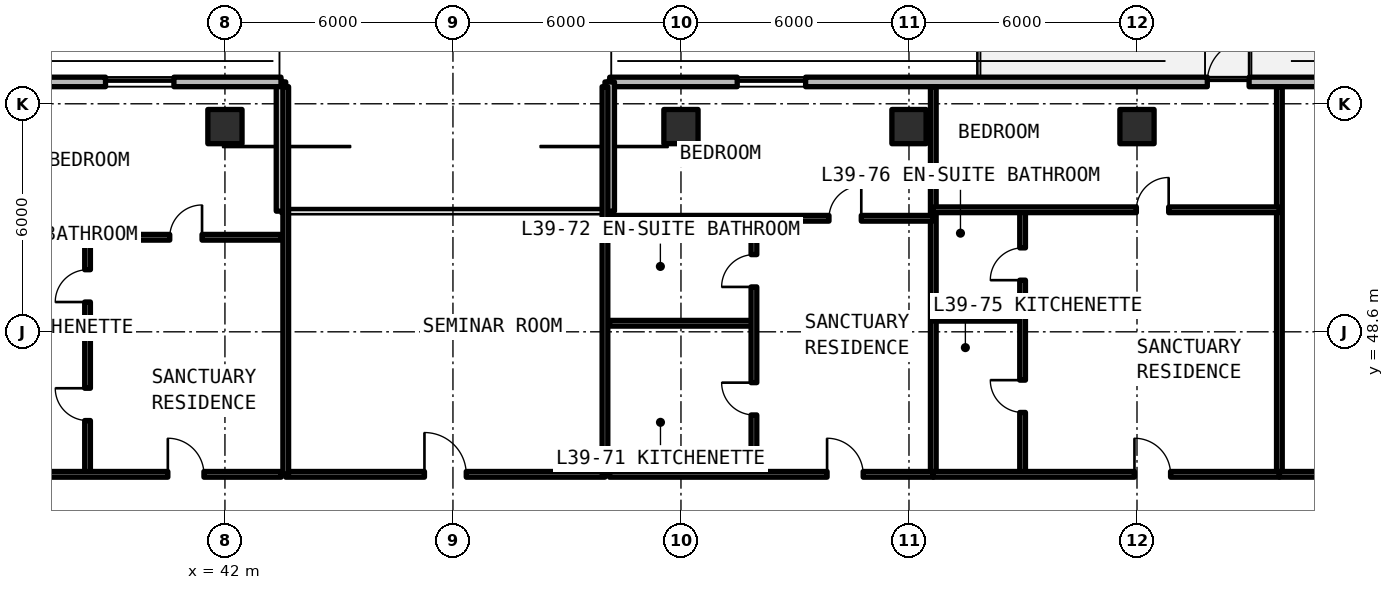
"""IFC4 building model, lengths in metres.
Left out: names, types, materials, properties, quantities, classifications, styles, units other than length and angle.
Written with IfcOpenShell. Run it as: python <this file> out.ifc"""

import sys

from ifc_helpers import new_model, si_unit, direction, frame, frame_2d, origin, origin_2d, place, context, subcontext, project, spatial, rectangle, extrude, element, fill, save


model = new_model("IFC4")
c1 = context("Model", 3, precision=1e-05, world=origin(), true_north=direction((0.0, 1.0)))
c2 = subcontext(c1, "Body", "Model", "MODEL_VIEW")
j1 = project(units=[si_unit("LENGTHUNIT", "METRE"), si_unit("PLANEANGLEUNIT", "RADIAN")], contexts=[c1])
p1 = place(None, origin())
s1 = spatial("IfcSite", under=j1, at=p1, CompositionType="ELEMENT")
p2 = place(p1, origin())
s2 = spatial("IfcBuilding", under=s1, at=p2, CompositionType="ELEMENT")
p3 = place(p2, frame((0.0, 0.0, 141.9)))
s3 = spatial("IfcBuildingStorey", under=s2, at=p3, CompositionType="ELEMENT", Elevation=141.9)
for number, where, z_axis, x_axis in (
    (1, (42.0, 54.0, 0.0), (0.0, 0.0, 1.0), (1.0, 0.0, 0.0)),
    (2, (54.0, 54.0, 0.0), (0.0, 0.0, 1.0), (1.0, 0.0, 0.0)),
    (3, (60.0, 54.0, 0.0), (0.0, 0.0, 1.0), (1.0, 0.0, 0.0)),
    (4, (66.0, 54.0, 0.0), (0.0, 0.0, 1.0), (1.0, 0.0, 0.0)),
):
    element("IfcColumn", number, at=place(p3, frame(where, z_axis=z_axis, x_axis=x_axis)), inside=s3, PredefinedType="COLUMN", context=c2, shape_type="SweptSolid", body=[
        extrude(rectangle(XDim=0.9, YDim=0.9, at=origin_2d()), origin(), (0.0, 0.0, 1.0), 3.3),
    ])
p4 = place(p3, frame((95.748, 55.175, 0.0), z_axis=(0.0, 0.0, 1.0), x_axis=(-1.0, 0.0, 0.0)))
e5 = element("IfcWall", 5, at=p4, inside=s3, PredefinedType="SOLIDWALL", context=c2, shape_type="SweptSolid", body=[
    extrude(rectangle(XDim=43.623, YDim=0.25, at=frame_2d((21.812, 0.0))), origin(), (0.0, 0.0, 1.0), 3.08),
])
p5 = place(p4, frame((26.798, 0.0, 0.0)))
e6 = element("IfcOpeningElement", 6, at=p5, cuts=e5, PredefinedType="OPENING", context=c2, shape_type="SweptSolid", body=[
    extrude(rectangle(XDim=1.1, YDim=2.15, at=frame_2d((0.55, 1.075))), frame((0.0, 0.135, 0.0), z_axis=(0.0, -1.0, 0.0), x_axis=(1.0, 0.0, 0.0)), (0.0, 0.0, 1.0), 0.27),
])
p6 = place(p4, frame((19.448, 0.0, 0.0)))
e7 = element("IfcOpeningElement", 7, at=p6, cuts=e5, PredefinedType="OPENING", context=c2, shape_type="SweptSolid", body=[
    extrude(rectangle(XDim=1.1, YDim=2.15, at=frame_2d((0.55, 1.075))), frame((0.0, 0.135, 0.0), z_axis=(0.0, -1.0, 0.0), x_axis=(1.0, 0.0, 0.0)), (0.0, 0.0, 1.0), 0.27),
])
p7 = place(p4, frame((38.468, 0.0, 0.78)))
e8 = element("IfcOpeningElement", 8, at=p7, cuts=e5, PredefinedType="OPENING", context=c2, shape_type="SweptSolid", body=[
    extrude(rectangle(XDim=1.8, YDim=1.66, at=frame_2d((0.9, 0.83))), frame((0.0, 0.135, 0.0), z_axis=(0.0, -1.0, 0.0), x_axis=(1.0, 0.0, 0.0)), (0.0, 0.0, 1.0), 0.27),
])
p8 = place(p4, frame((12.655, 0.0, 0.78)))
e9 = element("IfcOpeningElement", 9, at=p8, cuts=e5, PredefinedType="OPENING", context=c2, shape_type="SweptSolid", body=[
    extrude(rectangle(XDim=1.8, YDim=1.66, at=frame_2d((0.9, 0.83))), frame((0.0, 0.135, 0.0), z_axis=(0.0, -1.0, 0.0), x_axis=(1.0, 0.0, 0.0)), (0.0, 0.0, 1.0), 0.27),
])
p9 = place(p4, frame((3.188, 0.0, 0.78)))
e10 = element("IfcOpeningElement", 10, at=p9, cuts=e5, PredefinedType="OPENING", context=c2, shape_type="SweptSolid", body=[
    extrude(rectangle(XDim=1.8, YDim=1.66, at=frame_2d((0.9, 0.83))), frame((0.0, 0.135, 0.0), z_axis=(0.0, -1.0, 0.0), x_axis=(1.0, 0.0, 0.0)), (0.0, 0.0, 1.0), 0.27),
])
for number, where, z_axis, x_axis in (
    (11, (52.125, 55.175, 0.0), (0.0, 0.0, 1.0), (0.0, -1.0, 0.0)),
    (12, (43.475, 51.775, 0.0), (0.0, 0.0, 1.0), (0.0, 1.0, 0.0)),
):
    element("IfcWall", number, at=place(p3, frame(where, z_axis=z_axis, x_axis=x_axis)), inside=s3, PredefinedType="SOLIDWALL", context=c2, shape_type="SweptSolid", body=[
        extrude(rectangle(XDim=3.4, YDim=0.25, at=frame_2d((1.7, 0.0))), origin(), (0.0, 0.0, 1.0), 3.08),
    ])
p10 = place(p3, frame((43.475, 55.175, 0.0), z_axis=(0.0, 0.0, 1.0), x_axis=(-1.0, 0.0, 0.0)))
e13 = element("IfcWall", 13, at=p10, inside=s3, PredefinedType="SOLIDWALL", context=c2, shape_type="SweptSolid", body=[
    extrude(rectangle(XDim=19.623, YDim=0.25, at=frame_2d((9.812, 0.0))), origin(), (0.0, 0.0, 1.0), 3.08),
])
p11 = place(p10, frame((10.575, 0.0, 0.0)))
e14 = element("IfcOpeningElement", 14, at=p11, cuts=e13, PredefinedType="OPENING", context=c2, shape_type="SweptSolid", body=[
    extrude(rectangle(XDim=1.1, YDim=2.15, at=frame_2d((0.55, 1.075))), frame((0.0, 0.135, 0.0), z_axis=(0.0, -1.0, 0.0), x_axis=(1.0, 0.0, 0.0)), (0.0, 0.0, 1.0), 0.27),
])
p12 = place(p10, frame((18.0, 0.0, 0.78)))
e15 = element("IfcOpeningElement", 15, at=p12, cuts=e13, PredefinedType="OPENING", context=c2, shape_type="SweptSolid", body=[
    extrude(rectangle(XDim=0.85, YDim=1.65, at=frame_2d((0.425, 0.825))), frame((0.0, 0.135, 0.0), z_axis=(0.0, -1.0, 0.0), x_axis=(1.0, 0.0, 0.0)), (0.0, 0.0, 1.0), 0.27),
])
p13 = place(p10, frame((14.485, 0.0, 0.78)))
e16 = element("IfcOpeningElement", 16, at=p13, cuts=e13, PredefinedType="OPENING", context=c2, shape_type="SweptSolid", body=[
    extrude(rectangle(XDim=1.8, YDim=1.66, at=frame_2d((0.9, 0.83))), frame((0.0, 0.135, 0.0), z_axis=(0.0, -1.0, 0.0), x_axis=(1.0, 0.0, 0.0)), (0.0, 0.0, 1.0), 0.27),
])
p14 = place(p10, frame((2.818, 0.0, 0.78)))
e17 = element("IfcOpeningElement", 17, at=p14, cuts=e13, PredefinedType="OPENING", context=c2, shape_type="SweptSolid", body=[
    extrude(rectangle(XDim=1.8, YDim=1.66, at=frame_2d((0.9, 0.83))), frame((0.0, 0.135, 0.0), z_axis=(0.0, -1.0, 0.0), x_axis=(1.0, 0.0, 0.0)), (0.0, 0.0, 1.0), 0.27),
])
p15 = place(p3, frame((43.6, 44.85, 0.0), z_axis=(0.0, 0.0, 1.0), x_axis=(1.0, 0.0, 0.0)))
e18 = element("IfcWall", 18, at=p15, inside=s3, PredefinedType="SOLIDWALL", context=c2, shape_type="SweptSolid", body=[
    extrude(rectangle(XDim=8.4, YDim=0.15, at=frame_2d((4.2, 0.0))), origin(), (0.0, 0.0, 1.0), 2.35),
])
p16 = place(p15, frame((3.65, 0.0, 0.0)))
e19 = element("IfcOpeningElement", 19, at=p16, cuts=e18, PredefinedType="OPENING", context=c2, shape_type="SweptSolid", body=[
    extrude(rectangle(XDim=1.1, YDim=2.15, at=frame_2d((0.55, 1.075))), frame((0.0, 0.085, 0.0), z_axis=(0.0, -1.0, 0.0), x_axis=(1.0, 0.0, 0.0)), (0.0, 0.0, 1.0), 0.17),
])
for number, where, z_axis, x_axis in (
    (20, (43.6, 44.85, 0.0), (0.0, 0.0, 1.0), (0.0, 1.0, 0.0)),
    (21, (52.0, 44.85, 0.0), (0.0, 0.0, 1.0), (0.0, 1.0, 0.0)),
):
    element("IfcWall", number, at=place(p3, frame(where, z_axis=z_axis, x_axis=x_axis)), inside=s3, PredefinedType="SOLIDWALL", context=c2, shape_type="SweptSolid", body=[
        extrude(rectangle(XDim=10.2, YDim=0.15, at=frame_2d((5.1, 0.0))), origin(), (0.0, 0.0, 1.0), 2.35),
    ])
p17 = place(p3, frame((36.035, 48.53, 0.0), z_axis=(0.0, 0.0, 1.0), x_axis=(1.0, 0.0, 0.0)))
e22 = element("IfcWall", 22, at=p17, inside=s3, PredefinedType="PARTITIONING", context=c2, shape_type="SweptSolid", body=[
    extrude(rectangle(XDim=2.35, YDim=0.15, at=frame_2d((1.175, 0.0))), origin(), (0.0, 0.0, 1.0), 2.35),
])
p18 = place(p3, frame((38.385, 44.85, 0.0), z_axis=(0.0, 0.0, 1.0), x_axis=(0.0, 1.0, 0.0)))
e23 = element("IfcWall", 23, at=p18, inside=s3, PredefinedType="PARTITIONING", context=c2, shape_type="SweptSolid", body=[
    extrude(rectangle(XDim=6.238, YDim=0.15, at=frame_2d((3.119, 0.0))), origin(), (0.0, 0.0, 1.0), 2.35),
])
p19 = place(p18, frame((1.415, 0.0, 0.0)))
e24 = element("IfcOpeningElement", 24, at=p19, cuts=e23, PredefinedType="OPENING", context=c2, shape_type="SweptSolid", body=[
    extrude(rectangle(XDim=0.85, YDim=2.1, at=frame_2d((0.425, 1.05))), frame((0.0, 0.085, 0.0), z_axis=(0.0, -1.0, 0.0), x_axis=(1.0, 0.0, 0.0)), (0.0, 0.0, 1.0), 0.17),
])
p20 = place(p18, frame((4.534, 0.0, 0.0)))
e25 = element("IfcOpeningElement", 25, at=p20, cuts=e23, PredefinedType="OPENING", context=c2, shape_type="SweptSolid", body=[
    extrude(rectangle(XDim=0.85, YDim=2.1, at=frame_2d((0.425, 1.05))), frame((0.0, 0.085, 0.0), z_axis=(0.0, -1.0, 0.0), x_axis=(1.0, 0.0, 0.0)), (0.0, 0.0, 1.0), 0.17),
])
p21 = place(p3, frame((36.035, 51.088, 0.0), z_axis=(0.0, 0.0, 1.0), x_axis=(1.0, 0.0, 0.0)))
e26 = element("IfcWall", 26, at=p21, inside=s3, PredefinedType="PARTITIONING", context=c2, shape_type="SweptSolid", body=[
    extrude(rectangle(XDim=7.445, YDim=0.15, at=frame_2d((3.723, 0.0))), origin(), (0.0, 0.0, 1.0), 2.35),
])
p22 = place(p21, frame((4.513, 0.0, 0.0)))
e27 = element("IfcOpeningElement", 27, at=p22, cuts=e26, PredefinedType="OPENING", context=c2, shape_type="SweptSolid", body=[
    extrude(rectangle(XDim=0.85, YDim=2.1, at=frame_2d((0.425, 1.05))), frame((0.0, 0.085, 0.0), z_axis=(0.0, -1.0, 0.0), x_axis=(1.0, 0.0, 0.0)), (0.0, 0.0, 1.0), 0.17),
])
p23 = place(p3, frame((36.035, 44.85, 0.0), z_axis=(0.0, 0.0, 1.0), x_axis=(1.0, 0.0, 0.0)))
e28 = element("IfcWall", 28, at=p23, inside=s3, PredefinedType="SOLIDWALL", context=c2, shape_type="SweptSolid", body=[
    extrude(rectangle(XDim=7.445, YDim=0.15, at=frame_2d((3.723, 0.0))), origin(), (0.0, 0.0, 1.0), 2.35),
])
p24 = place(p23, frame((4.463, 0.0, 0.0)))
e29 = element("IfcOpeningElement", 29, at=p24, cuts=e28, PredefinedType="OPENING", context=c2, shape_type="SweptSolid", body=[
    extrude(rectangle(XDim=0.95, YDim=2.15, at=frame_2d((0.475, 1.075))), frame((0.0, 0.085, 0.0), z_axis=(0.0, -1.0, 0.0), x_axis=(1.0, 0.0, 0.0)), (0.0, 0.0, 1.0), 0.17),
])
p25 = place(p3, frame((60.64, 44.85, 0.0), z_axis=(0.0, 0.0, 1.0), x_axis=(0.0, 1.0, 0.0)))
e30 = element("IfcWall", 30, at=p25, inside=s3, PredefinedType="SOLIDWALL", context=c2, shape_type="SweptSolid", body=[
    extrude(rectangle(XDim=10.2, YDim=0.15, at=frame_2d((5.1, 0.0))), origin(), (0.0, 0.0, 1.0), 2.35),
])
p26 = place(p3, frame((52.12, 48.825, 0.0), z_axis=(0.0, 0.0, 1.0), x_axis=(1.0, 0.0, 0.0)))
e31 = element("IfcWall", 31, at=p26, inside=s3, PredefinedType="PARTITIONING", context=c2, shape_type="SweptSolid", body=[
    extrude(rectangle(XDim=3.8, YDim=0.15, at=frame_2d((1.9, 0.0))), origin(), (0.0, 0.0, 1.0), 2.35),
])
p27 = place(p3, frame((55.92, 44.85, 0.0), z_axis=(0.0, 0.0, 1.0), x_axis=(0.0, 1.0, 0.0)))
e32 = element("IfcWall", 32, at=p27, inside=s3, PredefinedType="PARTITIONING", context=c2, shape_type="SweptSolid", body=[
    extrude(rectangle(XDim=6.737, YDim=0.15, at=frame_2d((3.369, 0.0))), origin(), (0.0, 0.0, 1.0), 2.35),
])
p28 = place(p27, frame((1.562, 0.0, 0.0)))
e33 = element("IfcOpeningElement", 33, at=p28, cuts=e32, PredefinedType="OPENING", context=c2, shape_type="SweptSolid", body=[
    extrude(rectangle(XDim=0.85, YDim=2.1, at=frame_2d((0.425, 1.05))), frame((0.0, 0.085, 0.0), z_axis=(0.0, -1.0, 0.0), x_axis=(1.0, 0.0, 0.0)), (0.0, 0.0, 1.0), 0.17),
])
p29 = place(p27, frame((4.931, 0.0, 0.0)))
e34 = element("IfcOpeningElement", 34, at=p29, cuts=e32, PredefinedType="OPENING", context=c2, shape_type="SweptSolid", body=[
    extrude(rectangle(XDim=0.85, YDim=2.1, at=frame_2d((0.425, 1.05))), frame((0.0, 0.085, 0.0), z_axis=(0.0, -1.0, 0.0), x_axis=(1.0, 0.0, 0.0)), (0.0, 0.0, 1.0), 0.17),
])
p30 = place(p3, frame((52.12, 51.587, 0.0), z_axis=(0.0, 0.0, 1.0), x_axis=(1.0, 0.0, 0.0)))
e35 = element("IfcWall", 35, at=p30, inside=s3, PredefinedType="PARTITIONING", context=c2, shape_type="SweptSolid", body=[
    extrude(rectangle(XDim=8.52, YDim=0.15, at=frame_2d((4.26, 0.0))), origin(), (0.0, 0.0, 1.0), 2.35),
])
p31 = place(p30, frame((5.775, 0.0, 0.0)))
e36 = element("IfcOpeningElement", 36, at=p31, cuts=e35, PredefinedType="OPENING", context=c2, shape_type="SweptSolid", body=[
    extrude(rectangle(XDim=0.85, YDim=2.1, at=frame_2d((0.425, 1.05))), frame((0.0, 0.085, 0.0), z_axis=(0.0, -1.0, 0.0), x_axis=(1.0, 0.0, 0.0)), (0.0, 0.0, 1.0), 0.17),
])
p32 = place(p3, frame((52.12, 44.85, 0.0), z_axis=(0.0, 0.0, 1.0), x_axis=(1.0, 0.0, 0.0)))
e37 = element("IfcWall", 37, at=p32, inside=s3, PredefinedType="SOLIDWALL", context=c2, shape_type="SweptSolid", body=[
    extrude(rectangle(XDim=8.52, YDim=0.15, at=frame_2d((4.26, 0.0))), origin(), (0.0, 0.0, 1.0), 2.35),
])
p33 = place(p32, frame((5.725, 0.0, 0.0)))
e38 = element("IfcOpeningElement", 38, at=p33, cuts=e37, PredefinedType="OPENING", context=c2, shape_type="SweptSolid", body=[
    extrude(rectangle(XDim=0.95, YDim=2.15, at=frame_2d((0.475, 1.075))), frame((0.0, 0.085, 0.0), z_axis=(0.0, -1.0, 0.0), x_axis=(1.0, 0.0, 0.0)), (0.0, 0.0, 1.0), 0.17),
])
p34 = place(p3, frame((69.747, 44.85, 0.0), z_axis=(0.0, 0.0, 1.0), x_axis=(0.0, 1.0, 0.0)))
e39 = element("IfcWall", 39, at=p34, inside=s3, PredefinedType="SOLIDWALL", context=c2, shape_type="SweptSolid", body=[
    extrude(rectangle(XDim=10.2, YDim=0.15, at=frame_2d((5.1, 0.0))), origin(), (0.0, 0.0, 1.0), 2.35),
])
p35 = place(p3, frame((60.64, 48.957, 0.0), z_axis=(0.0, 0.0, 1.0), x_axis=(1.0, 0.0, 0.0)))
e40 = element("IfcWall", 40, at=p35, inside=s3, PredefinedType="PARTITIONING", context=c2, shape_type="SweptSolid", body=[
    extrude(rectangle(XDim=2.35, YDim=0.15, at=frame_2d((1.175, 0.0))), origin(), (0.0, 0.0, 1.0), 2.35),
])
p36 = place(p3, frame((62.99, 44.85, 0.0), z_axis=(0.0, 0.0, 1.0), x_axis=(0.0, 1.0, 0.0)))
e41 = element("IfcWall", 41, at=p36, inside=s3, PredefinedType="PARTITIONING", context=c2, shape_type="SweptSolid", body=[
    extrude(rectangle(XDim=6.961, YDim=0.15, at=frame_2d((3.48, 0.0))), origin(), (0.0, 0.0, 1.0), 2.35),
])
p37 = place(p36, frame((1.628, 0.0, 0.0)))
e42 = element("IfcOpeningElement", 42, at=p37, cuts=e41, PredefinedType="OPENING", context=c2, shape_type="SweptSolid", body=[
    extrude(rectangle(XDim=0.85, YDim=2.1, at=frame_2d((0.425, 1.05))), frame((0.0, 0.085, 0.0), z_axis=(0.0, -1.0, 0.0), x_axis=(1.0, 0.0, 0.0)), (0.0, 0.0, 1.0), 0.17),
])
p38 = place(p36, frame((5.109, 0.0, 0.0)))
e43 = element("IfcOpeningElement", 43, at=p38, cuts=e41, PredefinedType="OPENING", context=c2, shape_type="SweptSolid", body=[
    extrude(rectangle(XDim=0.85, YDim=2.1, at=frame_2d((0.425, 1.05))), frame((0.0, 0.085, 0.0), z_axis=(0.0, -1.0, 0.0), x_axis=(1.0, 0.0, 0.0)), (0.0, 0.0, 1.0), 0.17),
])
p39 = place(p3, frame((60.64, 51.811, 0.0), z_axis=(0.0, 0.0, 1.0), x_axis=(1.0, 0.0, 0.0)))
e44 = element("IfcWall", 44, at=p39, inside=s3, PredefinedType="PARTITIONING", context=c2, shape_type="SweptSolid", body=[
    extrude(rectangle(XDim=9.107, YDim=0.15, at=frame_2d((4.554, 0.0))), origin(), (0.0, 0.0, 1.0), 2.35),
])
p40 = place(p39, frame((5.344, 0.0, 0.0)))
e45 = element("IfcOpeningElement", 45, at=p40, cuts=e44, PredefinedType="OPENING", context=c2, shape_type="SweptSolid", body=[
    extrude(rectangle(XDim=0.85, YDim=2.1, at=frame_2d((0.425, 1.05))), frame((0.0, 0.085, 0.0), z_axis=(0.0, -1.0, 0.0), x_axis=(1.0, 0.0, 0.0)), (0.0, 0.0, 1.0), 0.17),
])
p41 = place(p3, frame((60.64, 44.85, 0.0), z_axis=(0.0, 0.0, 1.0), x_axis=(1.0, 0.0, 0.0)))
e46 = element("IfcWall", 46, at=p41, inside=s3, PredefinedType="SOLIDWALL", context=c2, shape_type="SweptSolid", body=[
    extrude(rectangle(XDim=9.107, YDim=0.15, at=frame_2d((4.554, 0.0))), origin(), (0.0, 0.0, 1.0), 2.35),
])
p42 = place(p41, frame((5.294, 0.0, 0.0)))
e47 = element("IfcOpeningElement", 47, at=p42, cuts=e46, PredefinedType="OPENING", context=c2, shape_type="SweptSolid", body=[
    extrude(rectangle(XDim=0.95, YDim=2.15, at=frame_2d((0.475, 1.075))), frame((0.0, 0.085, 0.0), z_axis=(0.0, -1.0, 0.0), x_axis=(1.0, 0.0, 0.0)), (0.0, 0.0, 1.0), 0.17),
])
p43 = place(p3, frame((69.747, 44.85, 0.0), z_axis=(0.0, 0.0, 1.0), x_axis=(1.0, 0.0, 0.0)))
e48 = element("IfcWall", 48, at=p43, inside=s3, PredefinedType="SOLIDWALL", context=c2, shape_type="SweptSolid", body=[
    extrude(rectangle(XDim=8.52, YDim=0.15, at=frame_2d((4.26, 0.0))), origin(), (0.0, 0.0, 1.0), 2.35),
])
p44 = place(p43, frame((3.71, 0.0, 0.0)))
e49 = element("IfcOpeningElement", 49, at=p44, cuts=e48, PredefinedType="OPENING", context=c2, shape_type="SweptSolid", body=[
    extrude(rectangle(XDim=1.1, YDim=2.15, at=frame_2d((0.55, 1.075))), frame((0.0, 0.085, 0.0), z_axis=(0.0, -1.0, 0.0), x_axis=(1.0, 0.0, 0.0)), (0.0, 0.0, 1.0), 0.17),
])
p45 = place(p5, frame((1.1, 0.0, 0.0), z_axis=(0.0, 0.0, 1.0), x_axis=(-1.0, 0.0, 0.0)))
e50 = element("IfcDoor", 50, at=p45, inside=s3, OperationType="SINGLE_SWING_LEFT", PredefinedType="DOOR", context=c2, shape_type="SweptSolid", body=[
    extrude(rectangle(XDim=1.1, YDim=2.15, at=frame_2d((0.55, 1.075))), frame((0.0, 0.025, 0.0), z_axis=(0.0, -1.0, 0.0), x_axis=(1.0, 0.0, 0.0)), (0.0, 0.0, 1.0), 0.05),
])
fill(e6, e50)
p46 = place(p7, origin())
e51 = element("IfcWindow", 51, at=p46, inside=s3, PartitioningType="SINGLE_PANEL", PredefinedType="WINDOW", context=c2, shape_type="SweptSolid", body=[
    extrude(rectangle(XDim=1.8, YDim=1.66, at=frame_2d((0.9, 0.83))), frame((0.0, 0.03, 0.0), z_axis=(0.0, -1.0, 0.0), x_axis=(1.0, 0.0, 0.0)), (0.0, 0.0, 1.0), 0.06),
])
fill(e8, e51)
p47 = place(p14, origin())
e52 = element("IfcWindow", 52, at=p47, inside=s3, PartitioningType="SINGLE_PANEL", PredefinedType="WINDOW", context=c2, shape_type="SweptSolid", body=[
    extrude(rectangle(XDim=1.8, YDim=1.66, at=frame_2d((0.9, 0.83))), frame((0.0, 0.03, 0.0), z_axis=(0.0, -1.0, 0.0), x_axis=(1.0, 0.0, 0.0)), (0.0, 0.0, 1.0), 0.06),
])
fill(e17, e52)
p48 = place(p16, origin())
e53 = element("IfcDoor", 53, at=p48, inside=s3, OperationType="SINGLE_SWING_LEFT", PredefinedType="DOOR", context=c2, shape_type="SweptSolid", body=[
    extrude(rectangle(XDim=1.1, YDim=2.15, at=frame_2d((0.55, 1.075))), frame((0.0, 0.025, 0.0), z_axis=(0.0, -1.0, 0.0), x_axis=(1.0, 0.0, 0.0)), (0.0, 0.0, 1.0), 0.05),
])
fill(e19, e53)
p49 = place(p19, origin())
e54 = element("IfcDoor", 54, at=p49, inside=s3, OperationType="SINGLE_SWING_RIGHT", PredefinedType="DOOR", context=c2, shape_type="SweptSolid", body=[
    extrude(rectangle(XDim=0.85, YDim=2.1, at=frame_2d((0.425, 1.05))), frame((0.0, 0.025, 0.0), z_axis=(0.0, -1.0, 0.0), x_axis=(1.0, 0.0, 0.0)), (0.0, 0.0, 1.0), 0.05),
])
fill(e24, e54)
p50 = place(p20, origin())
e55 = element("IfcDoor", 55, at=p50, inside=s3, OperationType="SINGLE_SWING_LEFT", PredefinedType="DOOR", context=c2, shape_type="SweptSolid", body=[
    extrude(rectangle(XDim=0.85, YDim=2.1, at=frame_2d((0.425, 1.05))), frame((0.0, 0.025, 0.0), z_axis=(0.0, -1.0, 0.0), x_axis=(1.0, 0.0, 0.0)), (0.0, 0.0, 1.0), 0.05),
])
fill(e25, e55)
p51 = place(p22, origin())
e56 = element("IfcDoor", 56, at=p51, inside=s3, OperationType="SINGLE_SWING_RIGHT", PredefinedType="DOOR", context=c2, shape_type="SweptSolid", body=[
    extrude(rectangle(XDim=0.85, YDim=2.1, at=frame_2d((0.425, 1.05))), frame((0.0, 0.025, 0.0), z_axis=(0.0, -1.0, 0.0), x_axis=(1.0, 0.0, 0.0)), (0.0, 0.0, 1.0), 0.05),
])
fill(e27, e56)
p52 = place(p24, origin())
e57 = element("IfcDoor", 57, at=p52, inside=s3, OperationType="SINGLE_SWING_LEFT", PredefinedType="DOOR", context=c2, shape_type="SweptSolid", body=[
    extrude(rectangle(XDim=0.95, YDim=2.15, at=frame_2d((0.475, 1.075))), frame((0.0, 0.025, 0.0), z_axis=(0.0, -1.0, 0.0), x_axis=(1.0, 0.0, 0.0)), (0.0, 0.0, 1.0), 0.05),
])
fill(e29, e57)
p53 = place(p28, origin())
e58 = element("IfcDoor", 58, at=p53, inside=s3, OperationType="SINGLE_SWING_RIGHT", PredefinedType="DOOR", context=c2, shape_type="SweptSolid", body=[
    extrude(rectangle(XDim=0.85, YDim=2.1, at=frame_2d((0.425, 1.05))), frame((0.0, 0.025, 0.0), z_axis=(0.0, -1.0, 0.0), x_axis=(1.0, 0.0, 0.0)), (0.0, 0.0, 1.0), 0.05),
])
fill(e33, e58)
p54 = place(p29, origin())
e59 = element("IfcDoor", 59, at=p54, inside=s3, OperationType="SINGLE_SWING_LEFT", PredefinedType="DOOR", context=c2, shape_type="SweptSolid", body=[
    extrude(rectangle(XDim=0.85, YDim=2.1, at=frame_2d((0.425, 1.05))), frame((0.0, 0.025, 0.0), z_axis=(0.0, -1.0, 0.0), x_axis=(1.0, 0.0, 0.0)), (0.0, 0.0, 1.0), 0.05),
])
fill(e34, e59)
p55 = place(p31, origin())
e60 = element("IfcDoor", 60, at=p55, inside=s3, OperationType="SINGLE_SWING_RIGHT", PredefinedType="DOOR", context=c2, shape_type="SweptSolid", body=[
    extrude(rectangle(XDim=0.85, YDim=2.1, at=frame_2d((0.425, 1.05))), frame((0.0, 0.025, 0.0), z_axis=(0.0, -1.0, 0.0), x_axis=(1.0, 0.0, 0.0)), (0.0, 0.0, 1.0), 0.05),
])
fill(e36, e60)
p56 = place(p33, origin())
e61 = element("IfcDoor", 61, at=p56, inside=s3, OperationType="SINGLE_SWING_LEFT", PredefinedType="DOOR", context=c2, shape_type="SweptSolid", body=[
    extrude(rectangle(XDim=0.95, YDim=2.15, at=frame_2d((0.475, 1.075))), frame((0.0, 0.025, 0.0), z_axis=(0.0, -1.0, 0.0), x_axis=(1.0, 0.0, 0.0)), (0.0, 0.0, 1.0), 0.05),
])
fill(e38, e61)
p57 = place(p37, origin())
e62 = element("IfcDoor", 62, at=p57, inside=s3, OperationType="SINGLE_SWING_RIGHT", PredefinedType="DOOR", context=c2, shape_type="SweptSolid", body=[
    extrude(rectangle(XDim=0.85, YDim=2.1, at=frame_2d((0.425, 1.05))), frame((0.0, 0.025, 0.0), z_axis=(0.0, -1.0, 0.0), x_axis=(1.0, 0.0, 0.0)), (0.0, 0.0, 1.0), 0.05),
])
fill(e42, e62)
p58 = place(p38, origin())
e63 = element("IfcDoor", 63, at=p58, inside=s3, OperationType="SINGLE_SWING_LEFT", PredefinedType="DOOR", context=c2, shape_type="SweptSolid", body=[
    extrude(rectangle(XDim=0.85, YDim=2.1, at=frame_2d((0.425, 1.05))), frame((0.0, 0.025, 0.0), z_axis=(0.0, -1.0, 0.0), x_axis=(1.0, 0.0, 0.0)), (0.0, 0.0, 1.0), 0.05),
])
fill(e43, e63)
p59 = place(p40, origin())
e64 = element("IfcDoor", 64, at=p59, inside=s3, OperationType="SINGLE_SWING_RIGHT", PredefinedType="DOOR", context=c2, shape_type="SweptSolid", body=[
    extrude(rectangle(XDim=0.85, YDim=2.1, at=frame_2d((0.425, 1.05))), frame((0.0, 0.025, 0.0), z_axis=(0.0, -1.0, 0.0), x_axis=(1.0, 0.0, 0.0)), (0.0, 0.0, 1.0), 0.05),
])
fill(e45, e64)
p60 = place(p42, origin())
e65 = element("IfcDoor", 65, at=p60, inside=s3, OperationType="SINGLE_SWING_LEFT", PredefinedType="DOOR", context=c2, shape_type="SweptSolid", body=[
    extrude(rectangle(XDim=0.95, YDim=2.15, at=frame_2d((0.475, 1.075))), frame((0.0, 0.025, 0.0), z_axis=(0.0, -1.0, 0.0), x_axis=(1.0, 0.0, 0.0)), (0.0, 0.0, 1.0), 0.05),
])
fill(e47, e65)
save(model, sys.argv[1])
